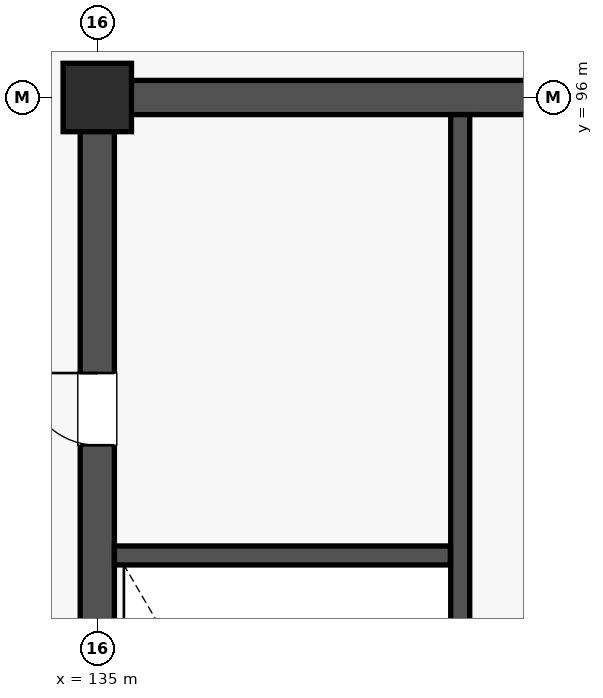
"""IFC4 building model, lengths in metres.
Left out: names, types, materials, properties, quantities, classifications, styles, units other than length and angle.
Written with IfcOpenShell. Run it as: python <this file> out.ifc"""

import sys

from ifc_helpers import new_model, si_unit, direction, frame, frame_2d, origin, origin_2d, place, context, subcontext, project, spatial, rectangle, extrude, element, fill, save


model = new_model("IFC4")
c1 = context("Model", 3, precision=1e-05, world=origin(), true_north=direction((0.0, 1.0)))
c2 = subcontext(c1, "Body", "Model", "MODEL_VIEW")
j1 = project(units=[si_unit("LENGTHUNIT", "METRE"), si_unit("PLANEANGLEUNIT", "RADIAN")], contexts=[c1])
p1 = place(None, origin())
s1 = spatial("IfcSite", under=j1, at=p1, CompositionType="ELEMENT")
p2 = place(p1, origin())
s2 = spatial("IfcBuilding", under=s1, at=p2, CompositionType="ELEMENT")
p3 = place(p2, frame((0.0, 0.0, -4.5)))
s3 = spatial("IfcBuildingStorey", under=s2, at=p3, CompositionType="ELEMENT", Elevation=-4.5)
p4 = place(p3, frame((135.0, 96.0, 0.0), z_axis=(0.0, 0.0, 1.0), x_axis=(1.0, 0.0, 0.0)))
e1 = element("IfcColumn", 1, at=p4, inside=s3, PredefinedType="COLUMN", context=c2, shape_type="SweptSolid", body=[
    extrude(rectangle(XDim=0.9, YDim=0.9, at=origin_2d()), origin(), (0.0, 0.0, 1.0), 4.5),
])
p5 = place(p3, frame((135.225, 96.0, 0.0), z_axis=(0.0, 0.0, 1.0), x_axis=(1.0, 0.0, 0.0)))
e2 = element("IfcWall", 2, at=p5, inside=s3, PredefinedType="SHEAR", context=c2, shape_type="SweptSolid", body=[
    extrude(rectangle(XDim=8.55, YDim=0.45, at=frame_2d((4.275, 0.0))), origin(), (0.0, 0.0, 1.0), 4.15),
])
p6 = place(p3, frame((135.0, 80.225, 0.0), z_axis=(0.0, 0.0, 1.0), x_axis=(0.0, 1.0, 0.0)))
e3 = element("IfcWall", 3, at=p6, inside=s3, PredefinedType="SHEAR", context=c2, shape_type="SweptSolid", body=[
    extrude(rectangle(XDim=15.55, YDim=0.45, at=frame_2d((7.775, 0.0))), origin(), (0.0, 0.0, 1.0), 4.15),
])
p7 = place(p6, frame((11.2, 0.0, 0.0)))
e4 = element("IfcOpeningElement", 4, at=p7, cuts=e3, PredefinedType="OPENING", context=c2, shape_type="SweptSolid", body=[
    extrude(rectangle(XDim=0.95, YDim=2.1, at=frame_2d((0.475, 1.05))), frame((0.0, 0.237, 0.0), z_axis=(0.0, -1.0, 0.0), x_axis=(1.0, 0.0, 0.0)), (0.0, 0.0, 1.0), 0.474),
])
p8 = place(p3, frame((139.775, 80.225, 0.0), z_axis=(0.0, 0.0, 1.0), x_axis=(0.0, 1.0, 0.0)))
e5 = element("IfcWall", 5, at=p8, inside=s3, PredefinedType="SOLIDWALL", context=c2, shape_type="SweptSolid", body=[
    extrude(rectangle(XDim=15.55, YDim=0.25, at=frame_2d((7.775, 0.0))), origin(), (0.0, 0.0, 1.0), 4.15),
])
p9 = place(p8, frame((0.45, 0.0, 0.0)))
e6 = element("IfcOpeningElement", 6, at=p9, cuts=e5, PredefinedType="OPENING", context=c2, shape_type="SweptSolid", body=[
    extrude(rectangle(XDim=1.1, YDim=2.15, at=frame_2d((0.55, 1.075))), frame((0.0, 0.137, 0.0), z_axis=(0.0, -1.0, 0.0), x_axis=(1.0, 0.0, 0.0)), (0.0, 0.0, 1.0), 0.274),
])
p10 = place(p3, frame((135.225, 89.975, 0.0), z_axis=(0.0, 0.0, 1.0), x_axis=(1.0, 0.0, 0.0)))
e7 = element("IfcWall", 7, at=p10, inside=s3, PredefinedType="SOLIDWALL", context=c2, shape_type="SweptSolid", body=[
    extrude(rectangle(XDim=4.42, YDim=0.25, at=frame_2d((2.21, 0.0))), origin(), (0.0, 0.0, 1.0), 4.15),
])
p11 = place(p7, origin())
e8 = element("IfcDoor", 8, at=p11, inside=s3, OperationType="SINGLE_SWING_RIGHT", PredefinedType="DOOR", context=c2, shape_type="SweptSolid", body=[
    extrude(rectangle(XDim=0.95, YDim=2.1, at=frame_2d((0.475, 1.05))), frame((0.0, 0.025, 0.0), z_axis=(0.0, -1.0, 0.0), x_axis=(1.0, 0.0, 0.0)), (0.0, 0.0, 1.0), 0.05),
])
fill(e4, e8)
save(model, sys.argv[1])
